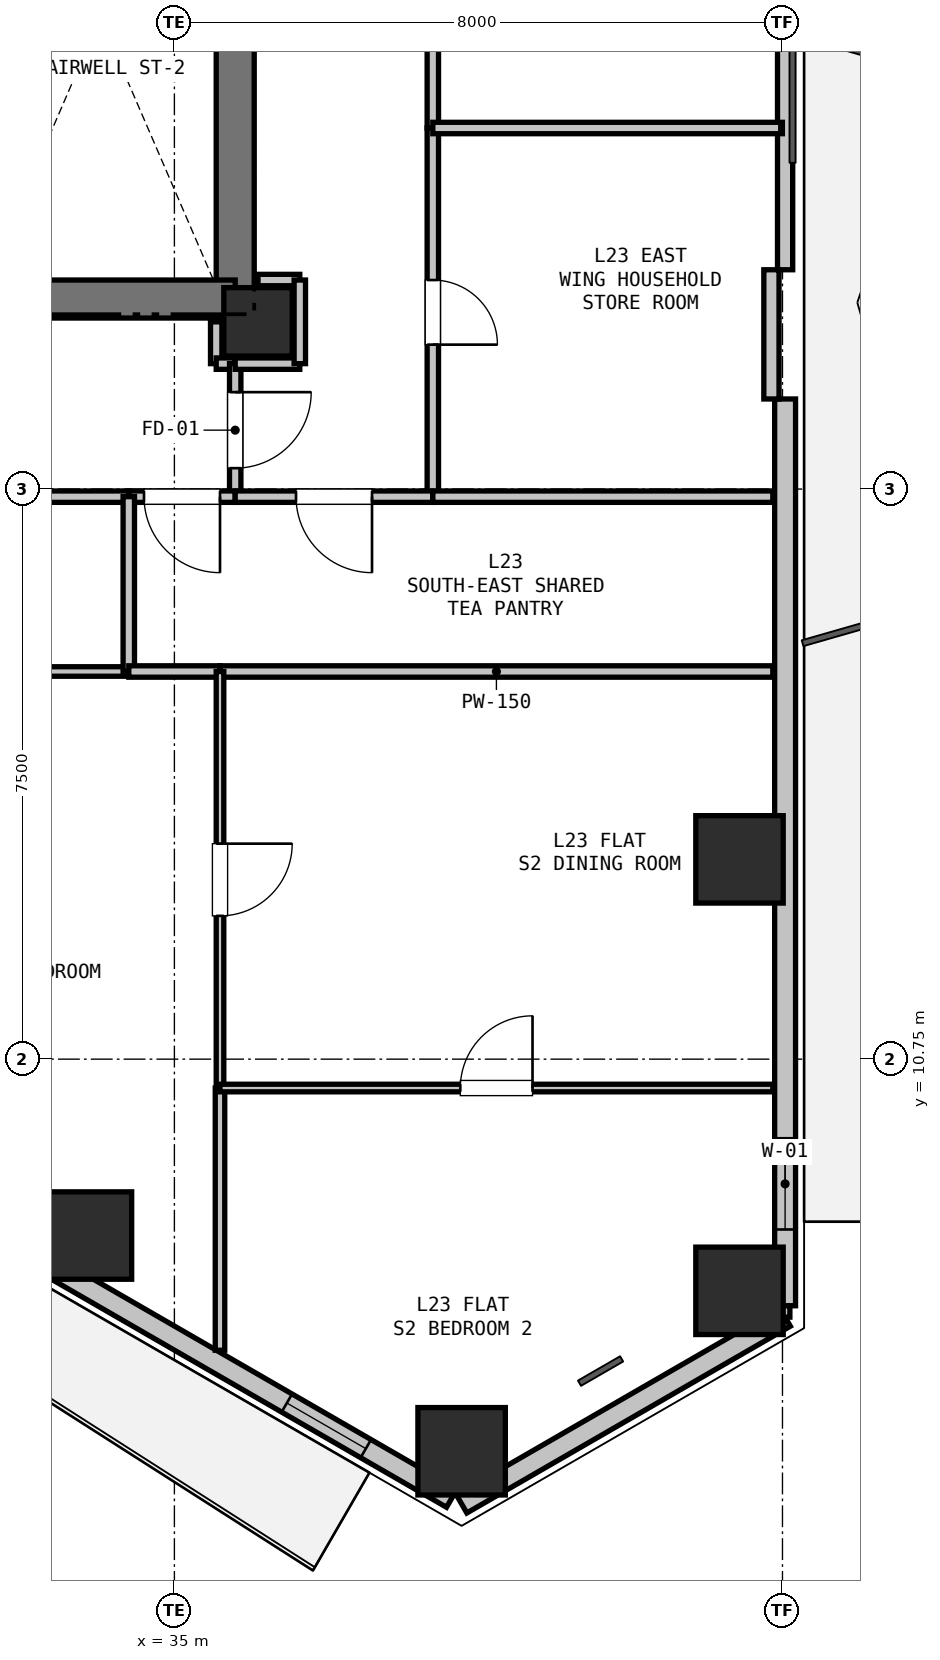
"""IFC4 building model, lengths in metres.
Left out: names, types, materials, properties, quantities, classifications, styles, units other than length and angle.
Written with IfcOpenShell. Run it as: python <this file> out.ifc"""

import sys

from ifc_helpers import new_model, si_unit, direction, frame, frame_2d, origin, origin_2d, place, context, subcontext, project, spatial, rectangle, hollow_rectangle, extrude, element, fill, save


model = new_model("IFC4")
c1 = context("Model", 3, precision=1e-05, world=origin(), true_north=direction((0.0, 1.0)))
c2 = subcontext(c1, "Body", "Model", "MODEL_VIEW")
j1 = project(units=[si_unit("LENGTHUNIT", "METRE"), si_unit("PLANEANGLEUNIT", "RADIAN")], contexts=[c1])
p1 = place(None, origin())
s1 = spatial("IfcSite", under=j1, at=p1, CompositionType="ELEMENT")
p2 = place(p1, origin())
s2 = spatial("IfcBuilding", under=s1, at=p2, CompositionType="ELEMENT")
p3 = place(p2, frame((0.0, 0.0, 86.7)))
s3 = spatial("IfcBuildingStorey", under=s2, at=p3, CompositionType="ELEMENT", Elevation=86.7)
p4 = place(p3, frame((36.1, 20.45, 0.0), z_axis=(0.0, 0.0, 1.0), x_axis=(1.0, 0.0, 0.0)))
e1 = element("IfcColumn", 1, at=p4, inside=s3, PredefinedType="COLUMN", context=c2, shape_type="SweptSolid", body=[
    extrude(rectangle(XDim=0.9, YDim=0.9, at=origin_2d()), origin(), (0.0, 0.0, 1.0), 3.3),
])
for number, where, z_axis, x_axis in (
    (2, (42.435, 13.378, 0.0), (0.0, 0.0, 1.0), (1.0, 0.0, 0.0)),
    (3, (42.435, 7.702, 0.0), (0.0, 0.0, 1.0), (1.0, 0.0, 0.0)),
    (4, (38.779, 5.591, 0.0), (0.0, 0.0, 1.0), (1.0, 0.0, 0.0)),
    (5, (33.863, 8.429, 0.0), (0.0, 0.0, 1.0), (1.0, 0.0, 0.0)),
):
    element("IfcColumn", number, at=place(p3, frame(where, z_axis=z_axis, x_axis=x_axis)), inside=s3, PredefinedType="COLUMN", context=c2, shape_type="SweptSolid", body=[
        extrude(hollow_rectangle(XDim=1.15, YDim=1.15, WallThickness=0.032, at=origin_2d()), origin(), (0.0, 0.0, 1.0), 3.3),
    ])
p5 = place(p3, frame((43.035, 7.356, 0.0), z_axis=(0.0, 0.0, 1.0), x_axis=(-0.866011848704, -0.500023477353, 0.0)))
e6 = element("IfcWall", 6, at=p5, inside=s3, PredefinedType="SOLIDWALL", context=c2, shape_type="SweptSolid", body=[
    extrude(rectangle(XDim=4.914, YDim=0.275, at=frame_2d((2.457, 0.0))), origin(), (0.0, 0.0, 1.0), 2.67),
])
p6 = place(p3, frame((43.035, 32.365, 0.0), z_axis=(0.0, 0.0, 1.0), x_axis=(0.0, -1.0, 0.0)))
e7 = element("IfcWall", 7, at=p6, inside=s3, PredefinedType="PARAPET", context=c2, shape_type="SweptSolid", body=[
    extrude(rectangle(XDim=11.229, YDim=0.2, at=frame_2d((5.615, 0.0))), origin(), (0.0, 0.0, 1.0), 0.2),
])
p7 = place(p3, frame((43.035, 19.435, 0.0), z_axis=(0.0, 0.0, 1.0), x_axis=(0.0, -1.0, 0.0)))
e8 = element("IfcWall", 8, at=p7, inside=s3, PredefinedType="SOLIDWALL", context=c2, shape_type="SweptSolid", body=[
    extrude(rectangle(XDim=11.93, YDim=0.275, at=frame_2d((5.965, 0.0))), origin(), (0.0, 0.0, 1.0), 2.67),
])
p8 = place(p7, frame((9.726, 0.0, 0.9)))
e9 = element("IfcOpeningElement", 9, at=p8, cuts=e8, PredefinedType="OPENING", context=c2, shape_type="SweptSolid", body=[
    extrude(rectangle(XDim=1.2, YDim=1.4, at=frame_2d((0.6, 0.7))), frame((0.0, 0.147, 0.0), z_axis=(0.0, -1.0, 0.0), x_axis=(1.0, 0.0, 0.0)), (0.0, 0.0, 1.0), 0.295),
])
p9 = place(p3, frame((42.854, 21.135, 0.0), z_axis=(0.0, 0.0, 1.0), x_axis=(0.0, -1.0, 0.0)))
e10 = element("IfcWall", 10, at=p9, inside=s3, PredefinedType="PARAPET", context=c2, shape_type="SweptSolid", body=[
    extrude(rectangle(XDim=1.7, YDim=0.2, at=frame_2d((0.85, 0.0))), origin(), (0.0, 0.0, 1.0), 2.67),
])
p10 = place(p3, frame((38.649, 4.973, 0.0), z_axis=(0.0, 0.0, 1.0), x_axis=(-0.866023023012, 0.500004123596, 0.0)))
e11 = element("IfcWall", 11, at=p10, inside=s3, PredefinedType="SOLIDWALL", context=c2, shape_type="SweptSolid", body=[
    extrude(rectangle(XDim=11.93, YDim=0.275, at=frame_2d((5.965, 0.0))), origin(), (0.0, 0.0, 1.0), 2.67),
])
p11 = place(p10, frame((7.616, 0.0, 0.0)))
e12 = element("IfcOpeningElement", 12, at=p11, cuts=e11, PredefinedType="OPENING", context=c2, shape_type="SweptSolid", body=[
    extrude(rectangle(XDim=1.1, YDim=2.1, at=frame_2d((0.55, 1.05))), frame((0.0, 0.147, 0.0), z_axis=(0.0, -1.0, 0.0), x_axis=(1.0, 0.0, 0.0)), (0.0, 0.0, 1.0), 0.295),
])
p12 = place(p10, frame((1.305, 0.0, 0.9)))
e13 = element("IfcOpeningElement", 13, at=p12, cuts=e11, PredefinedType="OPENING", context=c2, shape_type="SweptSolid", body=[
    extrude(rectangle(XDim=1.2, YDim=1.4, at=frame_2d((0.6, 0.7))), frame((0.0, 0.147, 0.0), z_axis=(0.0, -1.0, 0.0), x_axis=(1.0, 0.0, 0.0)), (0.0, 0.0, 1.0), 0.295),
])
p13 = place(p3, frame((35.8, 28.1, 0.0), z_axis=(0.0, 0.0, 1.0), x_axis=(0.0, -1.0, 0.0)))
e14 = element("IfcWall", 14, at=p13, inside=s3, PredefinedType="SHEAR", context=c2, shape_type="SweptSolid", body=[
    extrude(rectangle(XDim=7.35, YDim=0.5, at=frame_2d((3.675, 0.0))), origin(), (0.0, 0.0, 1.0), 3.05),
])
p14 = place(p3, frame((35.8, 20.75, 0.0), z_axis=(0.0, 0.0, 1.0), x_axis=(-1.0, 0.0, 0.0)))
e15 = element("IfcWall", 15, at=p14, inside=s3, PredefinedType="SHEAR", context=c2, shape_type="SweptSolid", body=[
    extrude(rectangle(XDim=3.45, YDim=0.5, at=frame_2d((1.725, 0.0))), origin(), (0.0, 0.0, 1.0), 3.05),
])
p15 = place(p3, frame((35.55, 20.45, 0.0), z_axis=(0.0, 0.0, 1.0), x_axis=(0.0, -1.0, 0.0)))
e16 = element("IfcWall", 16, at=p15, inside=s3, PredefinedType="PARTITIONING", context=c2, shape_type="SweptSolid", body=[
    extrude(rectangle(XDim=0.55, YDim=0.15, at=frame_2d((0.275, 0.0))), origin(), (0.0, 0.0, 1.0), 2.498),
])
p16 = place(p3, frame((35.55, 19.9, 0.0), z_axis=(0.0, 0.0, 1.0), x_axis=(1.0, 0.0, 0.0)))
e17 = element("IfcWall", 17, at=p16, inside=s3, PredefinedType="PARTITIONING", context=c2, shape_type="SweptSolid", body=[
    extrude(rectangle(XDim=0.25, YDim=0.15, at=frame_2d((0.125, 0.0))), origin(), (0.0, 0.0, 1.0), 3.05),
])
p17 = place(p3, frame((35.8, 19.9, 0.0), z_axis=(0.0, 0.0, 1.0), x_axis=(0.0, -1.0, 0.0)))
e18 = element("IfcWall", 18, at=p17, inside=s3, PredefinedType="PARTITIONING", context=c2, shape_type="SweptSolid", body=[
    extrude(rectangle(XDim=1.75, YDim=0.15, at=frame_2d((0.875, 0.0))), origin(), (0.0, 0.0, 1.0), 3.05),
])
p18 = place(p17, frame((0.375, 0.0, 0.0)))
e19 = element("IfcOpeningElement", 19, at=p18, cuts=e18, PredefinedType="OPENING", context=c2, shape_type="SweptSolid", body=[
    extrude(rectangle(XDim=1.0, YDim=2.15, at=frame_2d((0.5, 1.075))), frame((0.0, 0.085, 0.0), z_axis=(0.0, -1.0, 0.0), x_axis=(1.0, 0.0, 0.0)), (0.0, 0.0, 1.0), 0.17),
])
p19 = place(p3, frame((35.8, 18.15, 0.0), z_axis=(0.0, 0.0, 1.0), x_axis=(-1.0, 0.0, 0.0)))
e20 = element("IfcWall", 20, at=p19, inside=s3, PredefinedType="PARTITIONING", context=c2, shape_type="SweptSolid", body=[
    extrude(rectangle(XDim=1.4, YDim=0.15, at=frame_2d((0.7, 0.0))), origin(), (0.0, 0.0, 1.0), 3.05),
])
p20 = place(p19, frame((0.2, 0.0, 0.0)))
e21 = element("IfcOpeningElement", 21, at=p20, cuts=e20, PredefinedType="OPENING", context=c2, shape_type="SweptSolid", body=[
    extrude(rectangle(XDim=1.0, YDim=2.15, at=frame_2d((0.5, 1.075))), frame((0.0, 0.085, 0.0), z_axis=(0.0, -1.0, 0.0), x_axis=(1.0, 0.0, 0.0)), (0.0, 0.0, 1.0), 0.17),
])
p21 = place(p3, frame((34.4, 18.15, 0.0), z_axis=(0.0, 0.0, 1.0), x_axis=(-1.0, 0.0, 0.0)))
e22 = element("IfcWall", 22, at=p21, inside=s3, PredefinedType="PARTITIONING", context=c2, shape_type="SweptSolid", body=[
    extrude(rectangle(XDim=4.0, YDim=0.15, at=frame_2d((2.0, 0.0))), origin(), (0.0, 0.0, 1.0), 3.05),
])
p22 = place(p3, frame((36.65, 21.0, 0.0), z_axis=(0.0, 0.0, 1.0), x_axis=(-1.0, 0.0, 0.0)))
e23 = element("IfcWall", 23, at=p22, inside=s3, PredefinedType="PARTITIONING", context=c2, shape_type="SweptSolid", body=[
    extrude(rectangle(XDim=0.55, YDim=0.15, at=frame_2d((0.275, 0.0))), origin(), (0.0, 0.0, 1.0), 2.498),
])
p23 = place(p3, frame((38.4, 28.5, 0.0), z_axis=(0.0, 0.0, 1.0), x_axis=(0.0, -1.0, 0.0)))
e24 = element("IfcWall", 24, at=p23, inside=s3, PredefinedType="PARTITIONING", context=c2, shape_type="SweptSolid", body=[
    extrude(rectangle(XDim=5.5, YDim=0.15, at=frame_2d((2.75, 0.0))), origin(), (0.0, 0.0, 1.0), 3.05),
])
p24 = place(p23, frame((2.25, 0.0, 0.0)))
e25 = element("IfcOpeningElement", 25, at=p24, cuts=e24, PredefinedType="OPENING", context=c2, shape_type="SweptSolid", body=[
    extrude(rectangle(XDim=1.0, YDim=2.15, at=frame_2d((0.5, 1.075))), frame((0.0, 0.085, 0.0), z_axis=(0.0, -1.0, 0.0), x_axis=(1.0, 0.0, 0.0)), (0.0, 0.0, 1.0), 0.17),
])
p25 = place(p3, frame((38.4, 23.0, 0.0), z_axis=(0.0, 0.0, 1.0), x_axis=(0.0, -1.0, 0.0)))
e26 = element("IfcWall", 26, at=p25, inside=s3, PredefinedType="PARTITIONING", context=c2, shape_type="SweptSolid", body=[
    extrude(rectangle(XDim=4.85, YDim=0.15, at=frame_2d((2.425, 0.0))), origin(), (0.0, 0.0, 1.0), 3.05),
])
p26 = place(p25, frame((2.0, 0.0, 0.0)))
e27 = element("IfcOpeningElement", 27, at=p26, cuts=e26, PredefinedType="OPENING", context=c2, shape_type="SweptSolid", body=[
    extrude(rectangle(XDim=0.85, YDim=2.1, at=frame_2d((0.425, 1.05))), frame((0.0, 0.085, 0.0), z_axis=(0.0, -1.0, 0.0), x_axis=(1.0, 0.0, 0.0)), (0.0, 0.0, 1.0), 0.17),
])
p27 = place(p3, frame((38.4, 18.15, 0.0), z_axis=(0.0, 0.0, 1.0), x_axis=(-1.0, 0.0, 0.0)))
e28 = element("IfcWall", 28, at=p27, inside=s3, PredefinedType="PARTITIONING", context=c2, shape_type="SweptSolid", body=[
    extrude(rectangle(XDim=2.6, YDim=0.15, at=frame_2d((1.3, 0.0))), origin(), (0.0, 0.0, 1.0), 2.423),
])
p28 = place(p27, frame((0.8, 0.0, 0.0)))
e29 = element("IfcOpeningElement", 29, at=p28, cuts=e28, PredefinedType="OPENING", context=c2, shape_type="SweptSolid", body=[
    extrude(rectangle(XDim=1.0, YDim=2.15, at=frame_2d((0.5, 1.075))), frame((0.0, 0.085, 0.0), z_axis=(0.0, -1.0, 0.0), x_axis=(1.0, 0.0, 0.0)), (0.0, 0.0, 1.0), 0.17),
])
p29 = place(p3, frame((35.8, 19.9, 0.0), z_axis=(0.0, 0.0, 1.0), x_axis=(1.0, 0.0, 0.0)))
e30 = element("IfcWall", 30, at=p29, inside=s3, PredefinedType="PARTITIONING", context=c2, shape_type="SweptSolid", body=[
    extrude(rectangle(XDim=0.85, YDim=0.15, at=frame_2d((0.425, 0.0))), origin(), (0.0, 0.0, 1.0), 2.423),
])
p30 = place(p3, frame((36.65, 19.9, 0.0), z_axis=(0.0, 0.0, 1.0), x_axis=(0.0, 1.0, 0.0)))
e31 = element("IfcWall", 31, at=p30, inside=s3, PredefinedType="PARTITIONING", context=c2, shape_type="SweptSolid", body=[
    extrude(rectangle(XDim=1.1, YDim=0.15, at=frame_2d((0.55, 0.0))), origin(), (0.0, 0.0, 1.0), 3.05),
])
p31 = place(p3, frame((34.4, 15.85, 0.0), z_axis=(0.0, 0.0, 1.0), x_axis=(-1.0, 0.0, 0.0)))
e32 = element("IfcWall", 32, at=p31, inside=s3, PredefinedType="PARTITIONING", context=c2, shape_type="SweptSolid", body=[
    extrude(rectangle(XDim=4.0, YDim=0.125, at=frame_2d((2.0, 0.0))), origin(), (0.0, 0.0, 1.0), 3.05),
])
p32 = place(p31, frame((1.55, 0.0, 0.0)))
e33 = element("IfcOpeningElement", 33, at=p32, cuts=e32, PredefinedType="OPENING", context=c2, shape_type="SweptSolid", body=[
    extrude(rectangle(XDim=0.9, YDim=2.1, at=frame_2d((0.45, 1.05))), frame((0.0, 0.073, 0.0), z_axis=(0.0, -1.0, 0.0), x_axis=(1.0, 0.0, 0.0)), (0.0, 0.0, 1.0), 0.145),
])
p33 = place(p3, frame((34.4, 18.15, 0.0), z_axis=(0.0, 0.0, 1.0), x_axis=(0.0, -1.0, 0.0)))
e34 = element("IfcWall", 34, at=p33, inside=s3, PredefinedType="PARTITIONING", context=c2, shape_type="SweptSolid", body=[
    extrude(rectangle(XDim=2.3, YDim=0.15, at=frame_2d((1.15, 0.0))), origin(), (0.0, 0.0, 1.0), 3.05),
])
p34 = place(p3, frame((38.4, 18.15, 0.0), z_axis=(0.0, 0.0, 1.0), x_axis=(1.0, 0.0, 0.0)))
e35 = element("IfcWall", 35, at=p34, inside=s3, PredefinedType="PARTITIONING", context=c2, shape_type="SweptSolid", body=[
    extrude(rectangle(XDim=4.473, YDim=0.15, at=frame_2d((2.237, 0.0))), origin(), (0.0, 0.0, 1.0), 2.365),
])
p35 = place(p3, frame((42.873, 15.85, 0.0), z_axis=(0.0, 0.0, 1.0), x_axis=(-1.0, 0.0, 0.0)))
e36 = element("IfcWall", 36, at=p35, inside=s3, PredefinedType="PARTITIONING", context=c2, shape_type="SweptSolid", body=[
    extrude(rectangle(XDim=7.273, YDim=0.15, at=frame_2d((3.636, 0.0))), origin(), (0.0, 0.0, 1.0), 2.365),
])
p36 = place(p3, frame((35.6, 15.85, 0.0), z_axis=(0.0, 0.0, 1.0), x_axis=(-1.0, 0.0, 0.0)))
e37 = element("IfcWall", 37, at=p36, inside=s3, PredefinedType="PARTITIONING", context=c2, shape_type="SweptSolid", body=[
    extrude(rectangle(XDim=1.2, YDim=0.15, at=frame_2d((0.6, 0.0))), origin(), (0.0, 0.0, 1.0), 3.05),
])
p37 = place(p3, frame((42.999, 23.0, 0.0), z_axis=(0.0, 0.0, 1.0), x_axis=(-1.0, 0.0, 0.0)))
e38 = element("IfcWall", 38, at=p37, inside=s3, PredefinedType="PARTITIONING", context=c2, shape_type="SweptSolid", body=[
    extrude(rectangle(XDim=4.599, YDim=0.15, at=frame_2d((2.299, 0.0))), origin(), (0.0, 0.0, 1.0), 2.365),
])
p38 = place(p3, frame((35.6, 15.85, 0.0), z_axis=(0.0, 0.0, 1.0), x_axis=(0.0, -1.0, 0.0)))
e39 = element("IfcWall", 39, at=p38, inside=s3, PredefinedType="PARTITIONING", context=c2, shape_type="SweptSolid", body=[
    extrude(rectangle(XDim=5.48, YDim=0.1, at=frame_2d((2.74, 0.0))), origin(), (0.0, 0.0, 1.0), 3.05),
])
p39 = place(p38, frame((2.265, 0.0, 0.0)))
e40 = element("IfcOpeningElement", 40, at=p39, cuts=e39, PredefinedType="OPENING", context=c2, shape_type="SweptSolid", body=[
    extrude(rectangle(XDim=0.95, YDim=2.1, at=frame_2d((0.475, 1.05))), frame((0.0, 0.06, 0.0), z_axis=(0.0, -1.0, 0.0), x_axis=(1.0, 0.0, 0.0)), (0.0, 0.0, 1.0), 0.12),
])
p40 = place(p3, frame((35.6, 10.37, 0.0), z_axis=(0.0, 0.0, 1.0), x_axis=(0.0, -1.0, 0.0)))
e41 = element("IfcWall", 41, at=p40, inside=s3, PredefinedType="PARTITIONING", context=c2, shape_type="SweptSolid", body=[
    extrude(rectangle(XDim=3.45, YDim=0.125, at=frame_2d((1.725, 0.0))), origin(), (0.0, 0.0, 1.0), 2.66),
])
p41 = place(p3, frame((35.6, 10.37, 0.0), z_axis=(0.0, 0.0, 1.0), x_axis=(1.0, 0.0, 0.0)))
e42 = element("IfcWall", 42, at=p41, inside=s3, PredefinedType="PARTITIONING", context=c2, shape_type="SweptSolid", body=[
    extrude(rectangle(XDim=7.273, YDim=0.1, at=frame_2d((3.636, 0.0))), origin(), (0.0, 0.0, 1.0), 2.423),
])
p42 = place(p41, frame((3.162, 0.0, 0.0)))
e43 = element("IfcOpeningElement", 43, at=p42, cuts=e42, PredefinedType="OPENING", context=c2, shape_type="SweptSolid", body=[
    extrude(rectangle(XDim=0.95, YDim=2.1, at=frame_2d((0.475, 1.05))), frame((0.0, 0.06, 0.0), z_axis=(0.0, -1.0, 0.0), x_axis=(1.0, 0.0, 0.0)), (0.0, 0.0, 1.0), 0.12),
])
p43 = place(p3, frame((43.035, 7.506, 0.0), z_axis=(0.0, 0.0, 1.0), x_axis=(0.0, -1.0, 0.0)))
e44 = element("IfcWall", 44, at=p43, inside=s3, PredefinedType="PARTITIONING", context=c2, shape_type="SweptSolid", body=[
    extrude(rectangle(XDim=0.15, YDim=0.125, at=frame_2d((0.075, 0.0))), origin(), (0.0, 0.0, 1.0), 3.05),
])
p44 = place(p8, origin())
e45 = element("IfcWindow", 45, at=p44, inside=s3, PartitioningType="SINGLE_PANEL", PredefinedType="WINDOW", context=c2, shape_type="SweptSolid", body=[
    extrude(rectangle(XDim=1.2, YDim=1.4, at=frame_2d((0.6, 0.7))), frame((0.0, 0.03, 0.0), z_axis=(0.0, -1.0, 0.0), x_axis=(1.0, 0.0, 0.0)), (0.0, 0.0, 1.0), 0.06),
])
fill(e9, e45)
p45 = place(p12, origin())
e46 = element("IfcWindow", 46, at=p45, inside=s3, PartitioningType="SINGLE_PANEL", PredefinedType="WINDOW", context=c2, shape_type="SweptSolid", body=[
    extrude(rectangle(XDim=1.2, YDim=1.4, at=frame_2d((0.6, 0.7))), frame((0.0, 0.03, 0.0), z_axis=(0.0, -1.0, 0.0), x_axis=(1.0, 0.0, 0.0)), (0.0, 0.0, 1.0), 0.06),
])
fill(e13, e46)
p46 = place(p18, origin())
e47 = element("IfcDoor", 47, at=p46, inside=s3, OperationType="SINGLE_SWING_LEFT", PredefinedType="DOOR", context=c2, shape_type="SweptSolid", body=[
    extrude(rectangle(XDim=1.0, YDim=2.15, at=frame_2d((0.5, 1.075))), frame((0.0, 0.025, 0.0), z_axis=(0.0, -1.0, 0.0), x_axis=(1.0, 0.0, 0.0)), (0.0, 0.0, 1.0), 0.05),
])
fill(e19, e47)
p47 = place(p20, origin())
e48 = element("IfcDoor", 48, at=p47, inside=s3, OperationType="SINGLE_SWING_LEFT", PredefinedType="DOOR", context=c2, shape_type="SweptSolid", body=[
    extrude(rectangle(XDim=1.0, YDim=2.15, at=frame_2d((0.5, 1.075))), frame((0.0, 0.025, 0.0), z_axis=(0.0, -1.0, 0.0), x_axis=(1.0, 0.0, 0.0)), (0.0, 0.0, 1.0), 0.05),
])
fill(e21, e48)
p48 = place(p28, origin())
e49 = element("IfcDoor", 49, at=p48, inside=s3, OperationType="SINGLE_SWING_LEFT", PredefinedType="DOOR", context=c2, shape_type="SweptSolid", body=[
    extrude(rectangle(XDim=1.0, YDim=2.15, at=frame_2d((0.5, 1.075))), frame((0.0, 0.025, 0.0), z_axis=(0.0, -1.0, 0.0), x_axis=(1.0, 0.0, 0.0)), (0.0, 0.0, 1.0), 0.05),
])
fill(e29, e49)
p49 = place(p26, origin())
e50 = element("IfcDoor", 50, at=p49, inside=s3, OperationType="SINGLE_SWING_RIGHT", PredefinedType="DOOR", context=c2, shape_type="SweptSolid", body=[
    extrude(rectangle(XDim=0.85, YDim=2.1, at=frame_2d((0.425, 1.05))), frame((0.0, 0.025, 0.0), z_axis=(0.0, -1.0, 0.0), x_axis=(1.0, 0.0, 0.0)), (0.0, 0.0, 1.0), 0.05),
])
fill(e27, e50)
p50 = place(p39, origin())
e51 = element("IfcDoor", 51, at=p50, inside=s3, OperationType="SINGLE_SWING_LEFT", PredefinedType="DOOR", context=c2, shape_type="SweptSolid", body=[
    extrude(rectangle(XDim=0.95, YDim=2.1, at=frame_2d((0.475, 1.05))), frame((0.0, 0.025, 0.0), z_axis=(0.0, -1.0, 0.0), x_axis=(1.0, 0.0, 0.0)), (0.0, 0.0, 1.0), 0.05),
])
fill(e40, e51)
p51 = place(p42, origin())
e52 = element("IfcDoor", 52, at=p51, inside=s3, OperationType="SINGLE_SWING_RIGHT", PredefinedType="DOOR", context=c2, shape_type="SweptSolid", body=[
    extrude(rectangle(XDim=0.95, YDim=2.1, at=frame_2d((0.475, 1.05))), frame((0.0, 0.025, 0.0), z_axis=(0.0, -1.0, 0.0), x_axis=(1.0, 0.0, 0.0)), (0.0, 0.0, 1.0), 0.05),
])
fill(e43, e52)
save(model, sys.argv[1])
